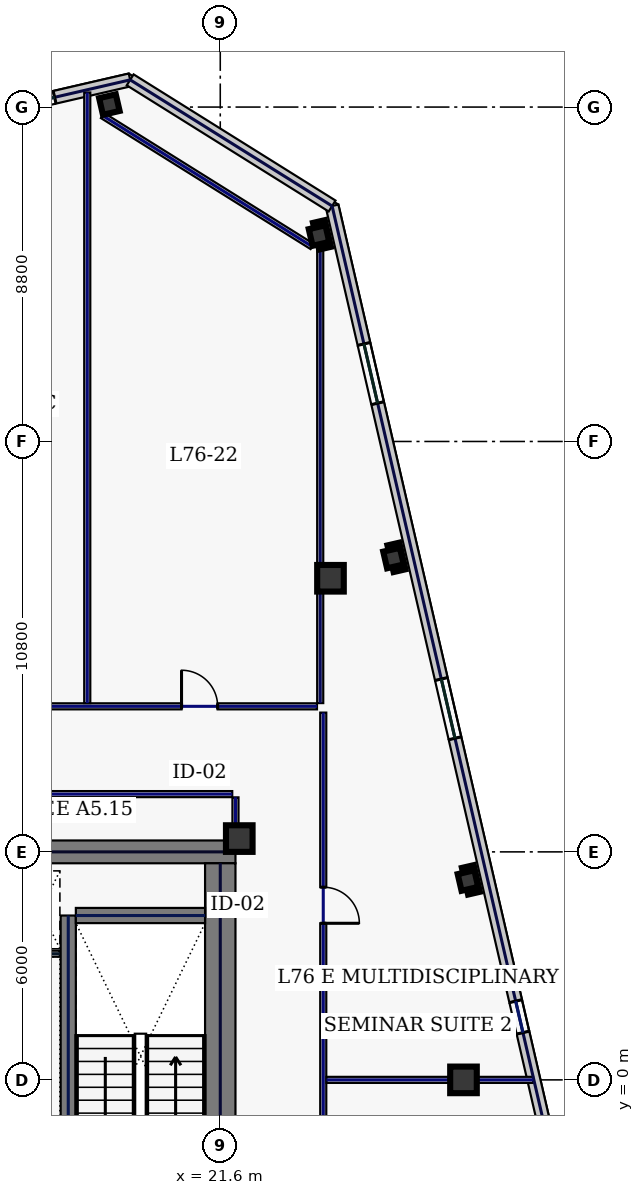
"""IFC4 building model, lengths in metres.
Left out: names, types, materials, properties, quantities, classifications, styles, units other than length and angle.
Written with IfcOpenShell. Run it as: python <this file> out.ifc"""

import sys

from ifc_helpers import new_model, si_unit, direction, frame, frame_2d, origin, origin_2d, place, context, subcontext, project, spatial, rectangle, hollow_rectangle, extrude, element, fill, save


model = new_model("IFC4")
c1 = context("Model", 3, precision=1e-05, world=origin(), true_north=direction((0.0, 1.0)))
c2 = subcontext(c1, "Body", "Model", "MODEL_VIEW")
j1 = project(units=[si_unit("LENGTHUNIT", "METRE"), si_unit("PLANEANGLEUNIT", "RADIAN")], contexts=[c1])
p1 = place(None, origin())
s1 = spatial("IfcSite", under=j1, at=p1, CompositionType="ELEMENT")
p2 = place(p1, origin())
s2 = spatial("IfcBuilding", under=s1, at=p2, CompositionType="ELEMENT")
p3 = place(p2, frame((0.0, 0.0, 325.0)))
s3 = spatial("IfcBuildingStorey", under=s2, at=p3, CompositionType="ELEMENT", Elevation=325.0)
p4 = place(p3, frame((10.5, 6.0, 0.0), z_axis=(0.0, 0.0, 1.0), x_axis=(1.0, 0.0, 0.0)))
e1 = element("IfcWall", 1, at=p4, inside=s3, PredefinedType="SHEAR", context=c2, shape_type="SweptSolid", body=[
    extrude(rectangle(XDim=11.5, YDim=0.6, at=frame_2d((5.75, 0.0))), origin(), (0.0, 0.0, 1.0), 3.74),
])
p5 = place(p3, frame((21.6, -5.7, 0.0), z_axis=(0.0, 0.0, 1.0), x_axis=(0.0, 1.0, 0.0)))
e2 = element("IfcWall", 2, at=p5, inside=s3, PredefinedType="SHEAR", context=c2, shape_type="SweptSolid", body=[
    extrude(rectangle(XDim=11.4, YDim=0.8, at=frame_2d((5.7, 0.0))), origin(), (0.0, 0.0, 1.0), 3.74),
])
p6 = place(p3, frame((17.6, -4.325, 0.0), z_axis=(0.0, 0.0, 1.0), x_axis=(0.0, 1.0, 0.0)))
e3 = element("IfcWall", 3, at=p6, inside=s3, PredefinedType="SHEAR", context=c2, shape_type="SweptSolid", body=[
    extrude(rectangle(XDim=8.65, YDim=0.4, at=frame_2d((4.325, 0.0))), origin(), (0.0, 0.0, 1.0), 3.74),
])
p7 = place(p6, frame((0.25, 0.0, 0.0)))
e4 = element("IfcOpeningElement", 4, at=p7, cuts=e3, PredefinedType="OPENING", context=c2, shape_type="SweptSolid", body=[
    extrude(rectangle(XDim=1.1, YDim=2.2, at=frame_2d((0.55, 1.1))), frame((0.0, 0.21, 0.0), z_axis=(0.0, -1.0, 0.0), x_axis=(1.0, 0.0, 0.0)), (0.0, 0.0, 1.0), 0.42),
])
p8 = place(p3, frame((17.8, 4.325, 0.0), z_axis=(0.0, 0.0, 1.0), x_axis=(1.0, 0.0, 0.0)))
e5 = element("IfcWall", 5, at=p8, inside=s3, PredefinedType="SHEAR", context=c2, shape_type="SweptSolid", body=[
    extrude(rectangle(XDim=3.4, YDim=0.4, at=frame_2d((1.7, 0.0))), origin(), (0.0, 0.0, 1.0), 3.74),
])
for number, where, z_axis, x_axis in (
    (6, (22.1, 6.35, 0.0), (0.0, 0.0, 1.0), (1.0, 0.0, 0.0)),
    (7, (24.5, 13.2, 0.0), (0.0, 0.0, 1.0), (1.0, 0.0, 0.0)),
    (8, (28.0, 0.0, 0.0), (0.0, 0.0, 1.0), (1.0, 0.0, 0.0)),
):
    element("IfcColumn", number, at=place(p3, frame(where, z_axis=z_axis, x_axis=x_axis)), inside=s3, PredefinedType="COLUMN", context=c2, shape_type="SweptSolid", body=[
        extrude(hollow_rectangle(XDim=0.7, YDim=0.7, WallThickness=0.032, at=origin_2d()), origin(), (0.0, 0.0, 1.0), 3.74),
    ])
for number, where, z_axis, x_axis in (
    (9, (18.682, 25.666, 0.0), (0.0, 0.0, 1.0), (0.974, 0.225, 0.0)),
    (10, (28.117, 5.246, 0.0), (0.0, 0.0, 1.0), (0.974, 0.225, 0.0)),
    (11, (26.158, 13.732, 0.0), (0.0, 0.0, 1.0), (0.974, 0.225, 0.0)),
    (12, (24.198, 22.219, 0.0), (0.0, 0.0, 1.0), (0.974, 0.225, 0.0)),
):
    element("IfcColumn", number, at=place(p3, frame(where, z_axis=z_axis, x_axis=x_axis)), inside=s3, PredefinedType="COLUMN", context=c2, shape_type="SweptSolid", body=[
        extrude(hollow_rectangle(XDim=0.45, YDim=0.45, WallThickness=0.022, at=origin_2d()), origin(), (0.0, 0.0, 1.0), 3.74),
    ])
p9 = place(p3, frame((19.229, 26.316, 0.0), z_axis=(0.0, 0.0, 1.0), x_axis=(-0.974372473594, -0.224940620392, 0.0)))
e13 = element("IfcWall", 13, at=p9, inside=s3, PredefinedType="STANDARD", context=c2, shape_type="SweptSolid", body=[
    extrude(rectangle(XDim=17.366, YDim=0.34, at=frame_2d((8.683, 0.0))), origin(), (0.0, 0.0, 1.0), 3.74),
])
p10 = place(p9, frame((13.187, 0.0, 1.0)))
e14 = element("IfcOpeningElement", 14, at=p10, cuts=e13, PredefinedType="OPENING", context=c2, shape_type="SweptSolid", body=[
    extrude(rectangle(XDim=1.4, YDim=1.85, at=frame_2d((0.7, 0.925))), frame((0.0, 0.18, 0.0), z_axis=(0.0, -1.0, 0.0), x_axis=(1.0, 0.0, 0.0)), (0.0, 0.0, 1.0), 0.36),
])
p11 = place(p9, frame((5.553, 0.0, 1.0)))
e15 = element("IfcOpeningElement", 15, at=p11, cuts=e13, PredefinedType="OPENING", context=c2, shape_type="SweptSolid", body=[
    extrude(rectangle(XDim=1.4, YDim=1.85, at=frame_2d((0.7, 0.925))), frame((0.0, 0.18, 0.0), z_axis=(0.0, -1.0, 0.0), x_axis=(1.0, 0.0, 0.0)), (0.0, 0.0, 1.0), 0.36),
])
p12 = place(p9, frame((2.041, 0.0, 1.0)))
e16 = element("IfcOpeningElement", 16, at=p12, cuts=e13, PredefinedType="OPENING", context=c2, shape_type="SweptSolid", body=[
    extrude(rectangle(XDim=1.4, YDim=1.85, at=frame_2d((0.7, 0.925))), frame((0.0, 0.18, 0.0), z_axis=(0.0, -1.0, 0.0), x_axis=(1.0, 0.0, 0.0)), (0.0, 0.0, 1.0), 0.36),
])
p13 = place(p3, frame((32.686, -12.276, 0.0), z_axis=(0.0, 0.0, 1.0), x_axis=(-0.224953091034, 0.974369594576, 0.0)))
e17 = element("IfcWall", 17, at=p13, inside=s3, PredefinedType="STANDARD", context=c2, shape_type="SweptSolid", body=[
    extrude(rectangle(XDim=36.2, YDim=0.34, at=frame_2d((18.1, 0.0))), origin(), (0.0, 0.0, 1.0), 3.74),
])
p14 = place(p13, frame((3.725, 0.0, 0.58)))
e18 = element("IfcOpeningElement", 18, at=p14, cuts=e17, PredefinedType="OPENING", context=c2, shape_type="SweptSolid", body=[
    extrude(rectangle(XDim=1.6, YDim=2.3, at=frame_2d((0.8, 1.15))), frame((0.0, 0.18, 0.0), z_axis=(0.0, -1.0, 0.0), x_axis=(1.0, 0.0, 0.0)), (0.0, 0.0, 1.0), 0.36),
])
p15 = place(p13, frame((13.875, 0.0, 0.75)))
e19 = element("IfcOpeningElement", 19, at=p15, cuts=e17, PredefinedType="OPENING", context=c2, shape_type="SweptSolid", body=[
    extrude(rectangle(XDim=0.85, YDim=1.85, at=frame_2d((0.425, 0.925))), frame((0.0, 0.18, 0.0), z_axis=(0.0, -1.0, 0.0), x_axis=(1.0, 0.0, 0.0)), (0.0, 0.0, 1.0), 0.36),
])
p16 = place(p13, frame((21.825, 0.0, 0.58)))
e20 = element("IfcOpeningElement", 20, at=p16, cuts=e17, PredefinedType="OPENING", context=c2, shape_type="SweptSolid", body=[
    extrude(rectangle(XDim=1.6, YDim=2.3, at=frame_2d((0.8, 1.15))), frame((0.0, 0.18, 0.0), z_axis=(0.0, -1.0, 0.0), x_axis=(1.0, 0.0, 0.0)), (0.0, 0.0, 1.0), 0.36),
])
p17 = place(p13, frame((30.875, 0.0, 0.58)))
e21 = element("IfcOpeningElement", 21, at=p17, cuts=e17, PredefinedType="OPENING", context=c2, shape_type="SweptSolid", body=[
    extrude(rectangle(XDim=1.6, YDim=2.3, at=frame_2d((0.8, 1.15))), frame((0.0, 0.18, 0.0), z_axis=(0.0, -1.0, 0.0), x_axis=(1.0, 0.0, 0.0)), (0.0, 0.0, 1.0), 0.36),
])
p18 = place(p3, frame((24.542, 22.996, 0.0), z_axis=(0.0, 0.0, 1.0), x_axis=(-0.848055220921, 0.529907862057, 0.0)))
e22 = element("IfcWall", 22, at=p18, inside=s3, PredefinedType="STANDARD", context=c2, shape_type="SweptSolid", body=[
    extrude(rectangle(XDim=6.265, YDim=0.34, at=frame_2d((3.132, 0.0))), origin(), (0.0, 0.0, 1.0), 3.74),
])
p19 = place(p3, frame((15.725, 3.32, 0.0), z_axis=(0.0, 0.0, 1.0), x_axis=(1.0, 0.0, 0.0)))
e23 = element("IfcWall", 23, at=p19, inside=s3, PredefinedType="PARTITIONING", context=c2, shape_type="SweptSolid", body=[
    extrude(rectangle(XDim=1.655, YDim=0.16, at=frame_2d((0.827, 0.0))), origin(), (0.0, 0.0, 1.0), 3.74),
])
p20 = place(p3, frame((24.018, 21.931, 0.0), z_axis=(0.0, 0.0, 1.0), x_axis=(-0.848051009591, 0.529914601736, 0.0)))
e24 = element("IfcWall", 24, at=p20, inside=s3, PredefinedType="PARTITIONING", context=c2, shape_type="SweptSolid", body=[
    extrude(rectangle(XDim=6.505, YDim=0.16, at=frame_2d((3.253, 0.0))), origin(), (0.0, 0.0, 1.0), 3.74),
])
p21 = place(p3, frame((-24.145, 9.83, 0.0), z_axis=(0.0, 0.0, 1.0), x_axis=(1.0, 0.0, 0.0)))
e25 = element("IfcWall", 25, at=p21, inside=s3, PredefinedType="PARTITIONING", context=c2, shape_type="SweptSolid", body=[
    extrude(rectangle(XDim=48.29, YDim=0.16, at=frame_2d((24.145, 0.0))), origin(), (0.0, 0.0, 1.0), 3.74),
])
p22 = place(p21, frame((1.869, 0.0, 0.0)))
e26 = element("IfcOpeningElement", 26, at=p22, cuts=e25, PredefinedType="OPENING", context=c2, shape_type="SweptSolid", body=[
    extrude(rectangle(XDim=1.3, YDim=2.2, at=frame_2d((0.65, 1.1))), frame((0.0, 0.09, 0.0), z_axis=(0.0, -1.0, 0.0), x_axis=(1.0, 0.0, 0.0)), (0.0, 0.0, 1.0), 0.18),
])
p23 = place(p21, frame((6.24, 0.0, 0.0)))
e27 = element("IfcOpeningElement", 27, at=p23, cuts=e25, PredefinedType="OPENING", context=c2, shape_type="SweptSolid", body=[
    extrude(rectangle(XDim=1.3, YDim=2.2, at=frame_2d((0.65, 1.1))), frame((0.0, 0.09, 0.0), z_axis=(0.0, -1.0, 0.0), x_axis=(1.0, 0.0, 0.0)), (0.0, 0.0, 1.0), 0.18),
])
p24 = place(p21, frame((12.405, 0.0, 0.0)))
e28 = element("IfcOpeningElement", 28, at=p24, cuts=e25, PredefinedType="OPENING", context=c2, shape_type="SweptSolid", body=[
    extrude(rectangle(XDim=0.95, YDim=2.2, at=frame_2d((0.475, 1.1))), frame((0.0, 0.09, 0.0), z_axis=(0.0, -1.0, 0.0), x_axis=(1.0, 0.0, 0.0)), (0.0, 0.0, 1.0), 0.18),
])
p25 = place(p21, frame((20.28, 0.0, 0.0)))
e29 = element("IfcOpeningElement", 29, at=p25, cuts=e25, PredefinedType="OPENING", context=c2, shape_type="SweptSolid", body=[
    extrude(rectangle(XDim=1.3, YDim=2.2, at=frame_2d((0.65, 1.1))), frame((0.0, 0.09, 0.0), z_axis=(0.0, -1.0, 0.0), x_axis=(1.0, 0.0, 0.0)), (0.0, 0.0, 1.0), 0.18),
])
p26 = place(p21, frame((29.055, 0.0, 0.0)))
e30 = element("IfcOpeningElement", 30, at=p26, cuts=e25, PredefinedType="OPENING", context=c2, shape_type="SweptSolid", body=[
    extrude(rectangle(XDim=1.05, YDim=2.2, at=frame_2d((0.525, 1.1))), frame((0.0, 0.09, 0.0), z_axis=(0.0, -1.0, 0.0), x_axis=(1.0, 0.0, 0.0)), (0.0, 0.0, 1.0), 0.18),
])
p27 = place(p21, frame((37.605, 0.0, 0.0)))
e31 = element("IfcOpeningElement", 31, at=p27, cuts=e25, PredefinedType="OPENING", context=c2, shape_type="SweptSolid", body=[
    extrude(rectangle(XDim=0.95, YDim=2.2, at=frame_2d((0.475, 1.1))), frame((0.0, 0.09, 0.0), z_axis=(0.0, -1.0, 0.0), x_axis=(1.0, 0.0, 0.0)), (0.0, 0.0, 1.0), 0.18),
])
p28 = place(p21, frame((44.726, 0.0, 0.0)))
e32 = element("IfcOpeningElement", 32, at=p28, cuts=e25, PredefinedType="OPENING", context=c2, shape_type="SweptSolid", body=[
    extrude(rectangle(XDim=0.95, YDim=2.2, at=frame_2d((0.475, 1.1))), frame((0.0, 0.09, 0.0), z_axis=(0.0, -1.0, 0.0), x_axis=(1.0, 0.0, 0.0)), (0.0, 0.0, 1.0), 0.18),
])
p29 = place(p3, frame((24.31, 9.665, 0.0), z_axis=(0.0, 0.0, 1.0), x_axis=(0.0, -1.0, 0.0)))
e33 = element("IfcWall", 33, at=p29, inside=s3, PredefinedType="PARTITIONING", context=c2, shape_type="SweptSolid", body=[
    extrude(rectangle(XDim=19.28, YDim=0.16, at=frame_2d((9.64, 0.0))), origin(), (0.0, 0.0, 1.0), 3.74),
])
p30 = place(p29, frame((13.931, 0.0, 0.0)))
e34 = element("IfcOpeningElement", 34, at=p30, cuts=e33, PredefinedType="OPENING", context=c2, shape_type="SweptSolid", body=[
    extrude(rectangle(XDim=0.95, YDim=2.2, at=frame_2d((0.475, 1.1))), frame((0.0, 0.09, 0.0), z_axis=(0.0, -1.0, 0.0), x_axis=(1.0, 0.0, 0.0)), (0.0, 0.0, 1.0), 0.18),
])
p31 = place(p29, frame((4.594, 0.0, 0.0)))
e35 = element("IfcOpeningElement", 35, at=p31, cuts=e33, PredefinedType="OPENING", context=c2, shape_type="SweptSolid", body=[
    extrude(rectangle(XDim=0.95, YDim=2.2, at=frame_2d((0.475, 1.1))), frame((0.0, 0.09, 0.0), z_axis=(0.0, -1.0, 0.0), x_axis=(1.0, 0.0, 0.0)), (0.0, 0.0, 1.0), 0.18),
])
p32 = place(p3, frame((21.915, 7.52, 0.0), z_axis=(0.0, 0.0, 1.0), x_axis=(-1.0, 0.0, 0.0)))
e36 = element("IfcWall", 36, at=p32, inside=s3, PredefinedType="PARTITIONING", context=c2, shape_type="SweptSolid", body=[
    extrude(rectangle(XDim=11.2, YDim=0.16, at=frame_2d((5.6, 0.0))), origin(), (0.0, 0.0, 1.0), 3.74),
])
p33 = place(p3, frame((22.0, 6.42, 0.0), z_axis=(0.0, 0.0, 1.0), x_axis=(0.0, 1.0, 0.0)))
e37 = element("IfcWall", 37, at=p33, inside=s3, PredefinedType="PARTITIONING", context=c2, shape_type="SweptSolid", body=[
    extrude(rectangle(XDim=1.015, YDim=0.16, at=frame_2d((0.508, 0.0))), origin(), (0.0, 0.0, 1.0), 3.74),
])
p34 = place(p3, frame((24.23, 9.915, 0.0), z_axis=(0.0, 0.0, 1.0), x_axis=(0.0, 1.0, 0.0)))
e38 = element("IfcWall", 38, at=p34, inside=s3, PredefinedType="PARTITIONING", context=c2, shape_type="SweptSolid", body=[
    extrude(rectangle(XDim=12.656, YDim=0.16, at=frame_2d((6.328, 0.0))), origin(), (0.0, 0.0, 1.0), 3.185),
])
p35 = place(p3, frame((18.1, 9.915, 0.0), z_axis=(0.0, 0.0, 1.0), x_axis=(0.0, 1.0, 0.0)))
e39 = element("IfcWall", 39, at=p35, inside=s3, PredefinedType="PARTITIONING", context=c2, shape_type="SweptSolid", body=[
    extrude(rectangle(XDim=16.069, YDim=0.16, at=frame_2d((8.034, 0.0))), origin(), (0.0, 0.0, 1.0), 3.74),
])
p36 = place(p3, frame((24.395, 0.0, 0.0), z_axis=(0.0, 0.0, 1.0), x_axis=(1.0, 0.0, 0.0)))
e40 = element("IfcWall", 40, at=p36, inside=s3, PredefinedType="PARTITIONING", context=c2, shape_type="SweptSolid", body=[
    extrude(rectangle(XDim=5.436, YDim=0.16, at=frame_2d((2.718, 0.0))), origin(), (0.0, 0.0, 1.0), 3.74),
])
p37 = place(p12, origin())
e41 = element("IfcWindow", 41, at=p37, inside=s3, PartitioningType="SINGLE_PANEL", PredefinedType="WINDOW", context=c2, shape_type="SweptSolid", body=[
    extrude(rectangle(XDim=1.4, YDim=1.85, at=frame_2d((0.7, 0.925))), frame((0.0, 0.03, 0.0), z_axis=(0.0, -1.0, 0.0), x_axis=(1.0, 0.0, 0.0)), (0.0, 0.0, 1.0), 0.06),
])
fill(e16, e41)
p38 = place(p15, origin())
e42 = element("IfcWindow", 42, at=p38, inside=s3, PartitioningType="SINGLE_PANEL", PredefinedType="WINDOW", context=c2, shape_type="SweptSolid", body=[
    extrude(rectangle(XDim=0.85, YDim=1.85, at=frame_2d((0.425, 0.925))), frame((0.0, 0.03, 0.0), z_axis=(0.0, -1.0, 0.0), x_axis=(1.0, 0.0, 0.0)), (0.0, 0.0, 1.0), 0.06),
])
fill(e19, e42)
p39 = place(p16, origin())
e43 = element("IfcWindow", 43, at=p39, inside=s3, PartitioningType="SINGLE_PANEL", PredefinedType="WINDOW", context=c2, shape_type="SweptSolid", body=[
    extrude(rectangle(XDim=1.6, YDim=2.3, at=frame_2d((0.8, 1.15))), frame((0.0, 0.03, 0.0), z_axis=(0.0, -1.0, 0.0), x_axis=(1.0, 0.0, 0.0)), (0.0, 0.0, 1.0), 0.06),
])
fill(e20, e43)
p40 = place(p17, origin())
e44 = element("IfcWindow", 44, at=p40, inside=s3, PartitioningType="SINGLE_PANEL", PredefinedType="WINDOW", context=c2, shape_type="SweptSolid", body=[
    extrude(rectangle(XDim=1.6, YDim=2.3, at=frame_2d((0.8, 1.15))), frame((0.0, 0.03, 0.0), z_axis=(0.0, -1.0, 0.0), x_axis=(1.0, 0.0, 0.0)), (0.0, 0.0, 1.0), 0.06),
])
fill(e21, e44)
p41 = place(p28, origin())
e45 = element("IfcDoor", 45, at=p41, inside=s3, OperationType="SINGLE_SWING_LEFT", PredefinedType="DOOR", context=c2, shape_type="SweptSolid", body=[
    extrude(rectangle(XDim=0.95, YDim=2.2, at=frame_2d((0.475, 1.1))), frame((0.0, 0.025, 0.0), z_axis=(0.0, -1.0, 0.0), x_axis=(1.0, 0.0, 0.0)), (0.0, 0.0, 1.0), 0.05),
])
fill(e32, e45)
p42 = place(p31, origin())
e46 = element("IfcDoor", 46, at=p42, inside=s3, OperationType="SINGLE_SWING_RIGHT", PredefinedType="DOOR", context=c2, shape_type="SweptSolid", body=[
    extrude(rectangle(XDim=0.95, YDim=2.2, at=frame_2d((0.475, 1.1))), frame((0.0, 0.025, 0.0), z_axis=(0.0, -1.0, 0.0), x_axis=(1.0, 0.0, 0.0)), (0.0, 0.0, 1.0), 0.05),
])
fill(e35, e46)
save(model, sys.argv[1])
